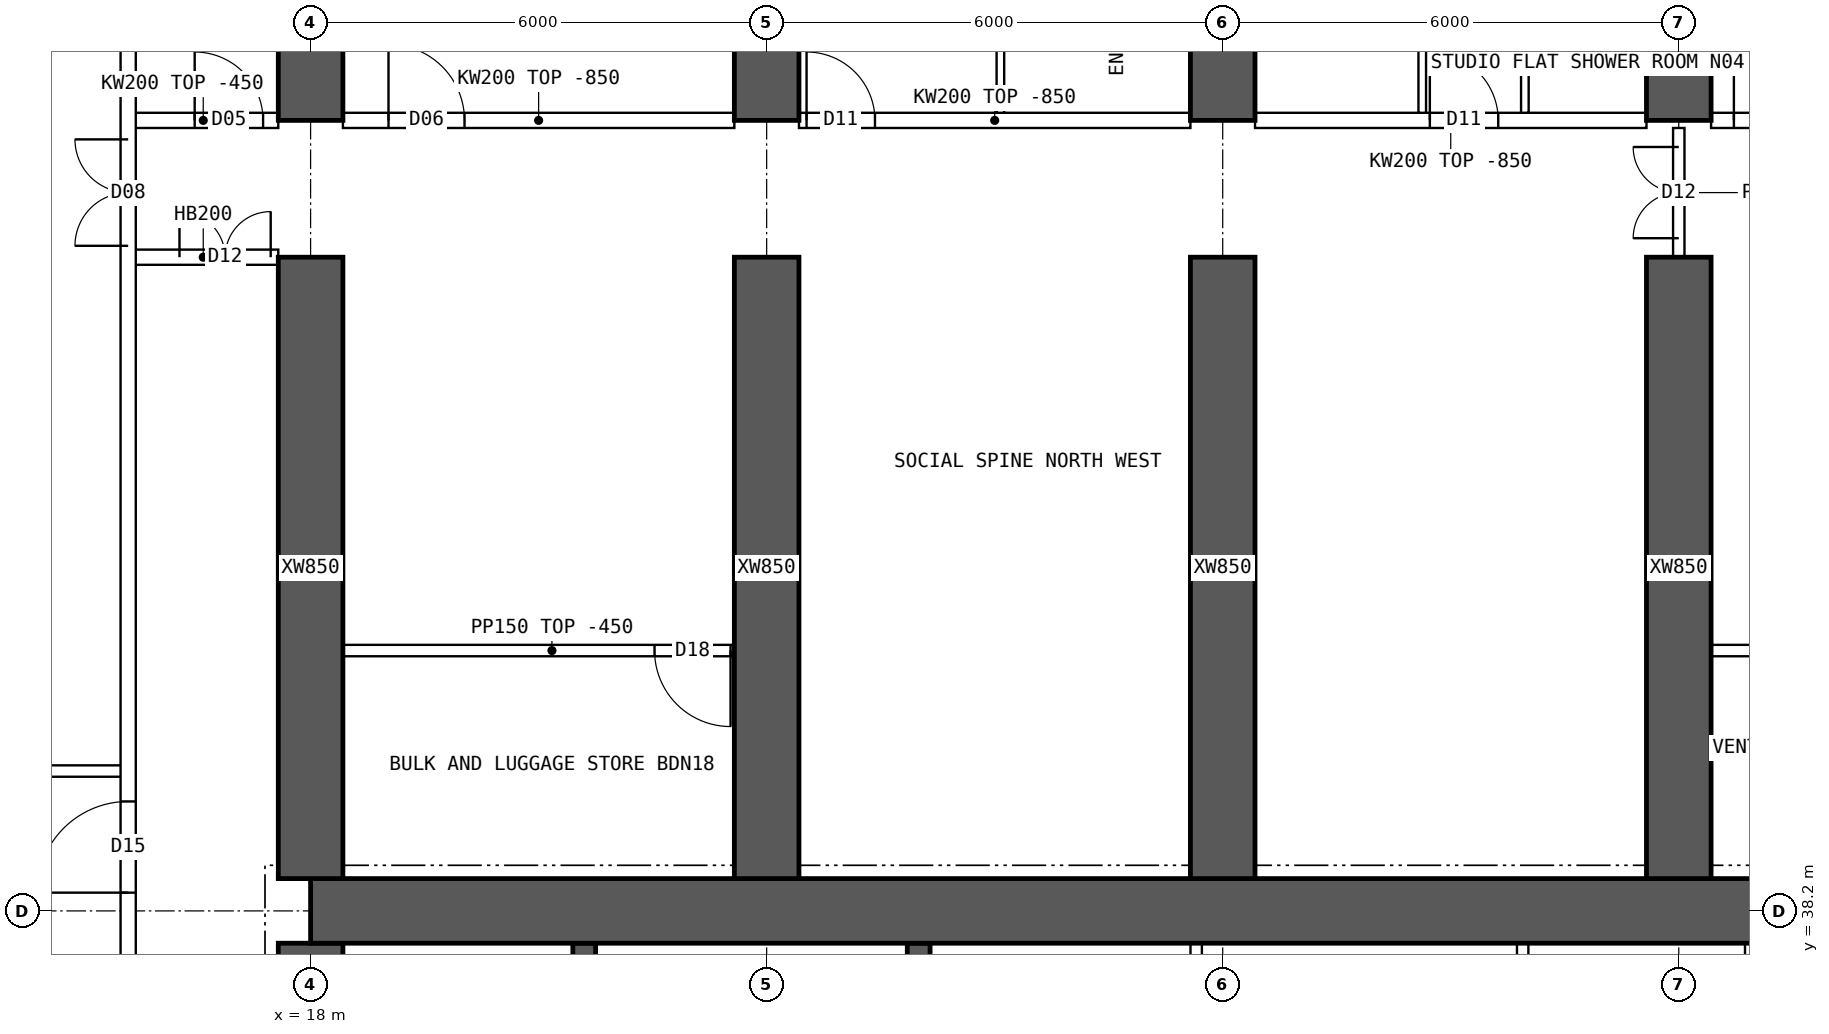
"""IFC4 building model, lengths in metres.
Left out: names, types, materials, properties, quantities, classifications, styles, units other than length and angle.
Written with IfcOpenShell. Run it as: python <this file> out.ifc"""

import sys

from ifc_helpers import new_model, si_unit, direction, frame, frame_2d, origin, place, context, subcontext, project, spatial, polyline, rectangle, outline, extrude, element, fill, save


model = new_model("IFC4")
c1 = context("Model", 3, precision=1e-05, world=origin(), true_north=direction((0.0, 1.0)))
c2 = subcontext(c1, "Body", "Model", "MODEL_VIEW")
j1 = project(units=[si_unit("LENGTHUNIT", "METRE"), si_unit("PLANEANGLEUNIT", "RADIAN")], contexts=[c1])
p1 = place(None, origin())
s1 = spatial("IfcSite", under=j1, at=p1, CompositionType="ELEMENT")
p2 = place(p1, origin())
s2 = spatial("IfcBuilding", under=s1, at=p2, CompositionType="ELEMENT")
p3 = place(p2, frame((0.0, 0.0, 174.85)))
s3 = spatial("IfcBuildingStorey", under=s2, at=p3, CompositionType="ELEMENT", Elevation=174.85)
p4 = place(p3, frame((18.0, 38.2, 0.0), z_axis=(0.0, 0.0, 1.0), x_axis=(1.0, 0.0, 0.0)))
e1 = element("IfcWall", 1, at=p4, inside=s3, PredefinedType="SHEAR", context=c2, shape_type="SweptSolid", body=[
    extrude(rectangle(XDim=48.0, YDim=0.85, at=frame_2d((24.0, 0.0))), origin(), (0.0, 0.0, 1.0), 3.75),
])
p5 = place(p3, frame((18.0, 26.225, 0.0), z_axis=(0.0, 0.0, 1.0), x_axis=(0.0, 1.0, 0.0)))
e2 = element("IfcWall", 2, at=p5, inside=s3, PredefinedType="SHEAR", context=c2, shape_type="SweptSolid", body=[
    extrude(rectangle(XDim=11.55, YDim=0.85, at=frame_2d((5.775, 0.0))), origin(), (0.0, 0.0, 1.0), 3.75),
])
p6 = place(p5, frame((5.075, 0.0, 0.0)))
e3 = element("IfcOpeningElement", 3, at=p6, cuts=e2, PredefinedType="OPENING", context=c2, shape_type="SweptSolid", body=[
    extrude(rectangle(XDim=1.2, YDim=2.1, at=frame_2d((0.6, 1.05))), frame((0.0, 0.435, 0.0), z_axis=(0.0, -1.0, 0.0), x_axis=(1.0, 0.0, 0.0)), (0.0, 0.0, 1.0), 0.87),
])
for number, where, z_axis, x_axis in (
    (4, (21.6, 34.75, 0.0), (0.0, 0.0, 1.0), (0.0, 1.0, 0.0)),
    (5, (26.0, 34.75, 0.0), (0.0, 0.0, 1.0), (0.0, 1.0, 0.0)),
):
    element("IfcWall", number, at=place(p3, frame(where, z_axis=z_axis, x_axis=x_axis)), inside=s3, PredefinedType="SHEAR", context=c2, shape_type="SweptSolid", body=[
        extrude(rectangle(XDim=3.025, YDim=0.3, at=frame_2d((1.512, 0.0))), origin(), (0.0, 0.0, 1.0), 3.75),
    ])
p7 = place(p3, frame((18.0, 48.6, 0.0), z_axis=(0.0, 0.0, 1.0), x_axis=(0.0, 1.0, 0.0)))
e6 = element("IfcWall", 6, at=p7, inside=s3, PredefinedType="SHEAR", context=c2, shape_type="SweptSolid", body=[
    extrude(rectangle(XDim=5.4, YDim=0.85, at=frame_2d((2.7, 0.0))), origin(), (0.0, 0.0, 1.0), 3.75),
])
p8 = place(p3, frame((18.0, 38.625, 0.0), z_axis=(0.0, 0.0, 1.0), x_axis=(0.0, 1.0, 0.0)))
e7 = element("IfcWall", 7, at=p8, inside=s3, PredefinedType="SHEAR", context=c2, shape_type="SweptSolid", body=[
    extrude(rectangle(XDim=8.175, YDim=0.85, at=frame_2d((4.087, 0.0))), origin(), (0.0, 0.0, 1.0), 3.75),
])
p9 = place(p3, frame((24.0, 48.6, 0.0), z_axis=(0.0, 0.0, 1.0), x_axis=(0.0, 1.0, 0.0)))
e8 = element("IfcWall", 8, at=p9, inside=s3, PredefinedType="SHEAR", context=c2, shape_type="SweptSolid", body=[
    extrude(rectangle(XDim=5.4, YDim=0.85, at=frame_2d((2.7, 0.0))), origin(), (0.0, 0.0, 1.0), 3.75),
])
p10 = place(p3, frame((24.0, 38.625, 0.0), z_axis=(0.0, 0.0, 1.0), x_axis=(0.0, 1.0, 0.0)))
e9 = element("IfcWall", 9, at=p10, inside=s3, PredefinedType="SHEAR", context=c2, shape_type="SweptSolid", body=[
    extrude(rectangle(XDim=8.175, YDim=0.85, at=frame_2d((4.087, 0.0))), origin(), (0.0, 0.0, 1.0), 3.75),
])
p11 = place(p3, frame((30.0, 48.6, 0.0), z_axis=(0.0, 0.0, 1.0), x_axis=(0.0, 1.0, 0.0)))
e10 = element("IfcWall", 10, at=p11, inside=s3, PredefinedType="SHEAR", context=c2, shape_type="SweptSolid", body=[
    extrude(rectangle(XDim=5.4, YDim=0.85, at=frame_2d((2.7, 0.0))), origin(), (0.0, 0.0, 1.0), 3.75),
])
p12 = place(p3, frame((30.0, 38.625, 0.0), z_axis=(0.0, 0.0, 1.0), x_axis=(0.0, 1.0, 0.0)))
e11 = element("IfcWall", 11, at=p12, inside=s3, PredefinedType="SHEAR", context=c2, shape_type="SweptSolid", body=[
    extrude(rectangle(XDim=8.175, YDim=0.85, at=frame_2d((4.087, 0.0))), origin(), (0.0, 0.0, 1.0), 3.75),
])
p13 = place(p3, frame((36.0, 48.6, 0.0), z_axis=(0.0, 0.0, 1.0), x_axis=(0.0, 1.0, 0.0)))
e12 = element("IfcWall", 12, at=p13, inside=s3, PredefinedType="SHEAR", context=c2, shape_type="SweptSolid", body=[
    extrude(rectangle(XDim=5.4, YDim=0.85, at=frame_2d((2.7, 0.0))), origin(), (0.0, 0.0, 1.0), 3.75),
])
p14 = place(p3, frame((36.0, 38.625, 0.0), z_axis=(0.0, 0.0, 1.0), x_axis=(0.0, 1.0, 0.0)))
e13 = element("IfcWall", 13, at=p14, inside=s3, PredefinedType="SHEAR", context=c2, shape_type="SweptSolid", body=[
    extrude(rectangle(XDim=8.175, YDim=0.85, at=frame_2d((4.087, 0.0))), origin(), (0.0, 0.0, 1.0), 3.75),
])
for number, where, z_axis, x_axis in (
    (14, (29.651, 34.75, 0.0), (0.0, 0.0, 1.0), (0.0, 1.0, 0.0)),
    (15, (33.946, 34.75, 0.0), (0.0, 0.0, 1.0), (0.0, 1.0, 0.0)),
    (16, (36.946, 34.75, 0.0), (0.0, 0.0, 1.0), (0.0, 1.0, 0.0)),
):
    element("IfcWall", number, at=place(p3, frame(where, z_axis=z_axis, x_axis=x_axis)), inside=s3, PredefinedType="SOLIDWALL", context=c2, shape_type="SweptSolid", body=[
        extrude(rectangle(XDim=3.025, YDim=0.15, at=frame_2d((1.512, 0.0))), origin(), (0.0, 0.0, 1.0), 3.3),
    ])
p15 = place(p3, frame((15.6, 48.6, 0.0), z_axis=(0.0, 0.0, 1.0), x_axis=(1.0, 0.0, 0.0)))
e17 = element("IfcWall", 17, at=p15, inside=s3, PredefinedType="SOLIDWALL", context=c2, shape_type="SweptSolid", body=[
    extrude(rectangle(XDim=1.975, YDim=0.2, at=frame_2d((0.987, 0.0))), origin(), (0.0, 0.0, 1.0), 3.3),
])
p16 = place(p15, frame((0.875, 0.0, 0.0)))
e18 = element("IfcOpeningElement", 18, at=p16, cuts=e17, PredefinedType="OPENING", context=c2, shape_type="SweptSolid", body=[
    extrude(rectangle(XDim=0.9, YDim=2.1, at=frame_2d((0.45, 1.05))), frame((0.0, 0.11, 0.0), z_axis=(0.0, -1.0, 0.0), x_axis=(1.0, 0.0, 0.0)), (0.0, 0.0, 1.0), 0.22),
])
p17 = place(p3, frame((15.6, 46.8, 0.0), z_axis=(0.0, 0.0, 1.0), x_axis=(1.0, 0.0, 0.0)))
e19 = element("IfcWall", 19, at=p17, inside=s3, PredefinedType="SOLIDWALL", context=c2, shape_type="SweptSolid", body=[
    extrude(rectangle(XDim=1.975, YDim=0.2, at=frame_2d((0.987, 0.0))), origin(), (0.0, 0.0, 1.0), 3.3),
])
p18 = place(p17, frame((0.675, 0.0, 0.0)))
e20 = element("IfcOpeningElement", 20, at=p18, cuts=e19, PredefinedType="OPENING", context=c2, shape_type="SweptSolid", body=[
    extrude(rectangle(XDim=1.2, YDim=2.1, at=frame_2d((0.6, 1.05))), frame((0.0, 0.11, 0.0), z_axis=(0.0, -1.0, 0.0), x_axis=(1.0, 0.0, 0.0)), (0.0, 0.0, 1.0), 0.22),
])
p19 = place(p3, frame((18.425, 48.6, 0.0), z_axis=(0.0, 0.0, 1.0), x_axis=(1.0, 0.0, 0.0)))
e21 = element("IfcWall", 21, at=p19, inside=s3, PredefinedType="SOLIDWALL", context=c2, shape_type="SweptSolid", body=[
    extrude(outline(polyline([(0.0, 0.0), (5.15, 0.0), (5.15, 2.9), (0.0, 2.9), (0.0, 0.0)])), frame((0.0, 0.1, 0.0), z_axis=(0.0, -1.0, 0.0), x_axis=(1.0, 0.0, 0.0)), (0.0, 0.0, 1.0), 0.2),
])
p20 = place(p19, frame((0.6, 0.0, 0.0)))
e22 = element("IfcOpeningElement", 22, at=p20, cuts=e21, PredefinedType="OPENING", context=c2, shape_type="SweptSolid", body=[
    extrude(rectangle(XDim=1.0, YDim=2.1, at=frame_2d((0.5, 1.05))), frame((0.0, 0.11, 0.0), z_axis=(0.0, -1.0, 0.0), x_axis=(1.0, 0.0, 0.0)), (0.0, 0.0, 1.0), 0.22),
])
p21 = place(p3, frame((24.425, 48.6, 0.0), z_axis=(0.0, 0.0, 1.0), x_axis=(1.0, 0.0, 0.0)))
e23 = element("IfcWall", 23, at=p21, inside=s3, PredefinedType="SOLIDWALL", context=c2, shape_type="SweptSolid", body=[
    extrude(outline(polyline([(0.0, 0.0), (5.15, 0.0), (5.15, 2.9), (0.0, 2.9), (0.0, 0.0)])), frame((0.0, 0.1, 0.0), z_axis=(0.0, -1.0, 0.0), x_axis=(1.0, 0.0, 0.0)), (0.0, 0.0, 1.0), 0.2),
])
p22 = place(p21, frame((0.1, 0.0, 0.0)))
e24 = element("IfcOpeningElement", 24, at=p22, cuts=e23, PredefinedType="OPENING", context=c2, shape_type="SweptSolid", body=[
    extrude(rectangle(XDim=0.9, YDim=2.1, at=frame_2d((0.45, 1.05))), frame((0.0, 0.11, 0.0), z_axis=(0.0, -1.0, 0.0), x_axis=(1.0, 0.0, 0.0)), (0.0, 0.0, 1.0), 0.22),
])
p23 = place(p3, frame((30.425, 48.6, 0.0), z_axis=(0.0, 0.0, 1.0), x_axis=(1.0, 0.0, 0.0)))
e25 = element("IfcWall", 25, at=p23, inside=s3, PredefinedType="SOLIDWALL", context=c2, shape_type="SweptSolid", body=[
    extrude(outline(polyline([(0.0, 0.0), (5.15, 0.0), (5.15, 2.9), (0.0, 2.9), (0.0, 0.0)])), frame((0.0, 0.1, 0.0), z_axis=(0.0, -1.0, 0.0), x_axis=(1.0, 0.0, 0.0)), (0.0, 0.0, 1.0), 0.2),
])
p24 = place(p23, frame((2.3, 0.0, 0.0)))
e26 = element("IfcOpeningElement", 26, at=p24, cuts=e25, PredefinedType="OPENING", context=c2, shape_type="SweptSolid", body=[
    extrude(rectangle(XDim=0.9, YDim=2.1, at=frame_2d((0.45, 1.05))), frame((0.0, 0.11, 0.0), z_axis=(0.0, -1.0, 0.0), x_axis=(1.0, 0.0, 0.0)), (0.0, 0.0, 1.0), 0.22),
])
p25 = place(p3, frame((36.425, 48.6, 0.0), z_axis=(0.0, 0.0, 1.0), x_axis=(1.0, 0.0, 0.0)))
e27 = element("IfcWall", 27, at=p25, inside=s3, PredefinedType="SOLIDWALL", context=c2, shape_type="SweptSolid", body=[
    extrude(outline(polyline([(0.0, 0.0), (5.15, 0.0), (5.15, 2.9), (0.0, 2.9), (0.0, 0.0)])), frame((0.0, 0.1, 0.0), z_axis=(0.0, -1.0, 0.0), x_axis=(1.0, 0.0, 0.0)), (0.0, 0.0, 1.0), 0.2),
])
p26 = place(p25, frame((0.3, 0.0, 0.0)))
e28 = element("IfcOpeningElement", 28, at=p26, cuts=e27, PredefinedType="OPENING", context=c2, shape_type="SweptSolid", body=[
    extrude(rectangle(XDim=1.0, YDim=2.1, at=frame_2d((0.5, 1.05))), frame((0.0, 0.11, 0.0), z_axis=(0.0, -1.0, 0.0), x_axis=(1.0, 0.0, 0.0)), (0.0, 0.0, 1.0), 0.22),
])
p27 = place(p3, frame((27.075, 51.45, 0.0), z_axis=(0.0, 0.0, 1.0), x_axis=(0.0, -1.0, 0.0)))
e29 = element("IfcWall", 29, at=p27, inside=s3, PredefinedType="PARTITIONING", context=c2, shape_type="SweptSolid", body=[
    extrude(outline(polyline([(0.0, 0.0), (2.75, 0.0), (2.75, 2.9), (2.702, 2.9), (2.7, 3.3), (0.0, 3.3), (0.0, 0.0)])), frame((0.0, 0.05, 0.0), z_axis=(0.0, -1.0, 0.0), x_axis=(1.0, 0.0, 0.0)), (0.0, 0.0, 1.0), 0.1),
])
p28 = place(p3, frame((32.625, 51.05, 0.0), z_axis=(0.0, 0.0, 1.0), x_axis=(0.0, -1.0, 0.0)))
e30 = element("IfcWall", 30, at=p28, inside=s3, PredefinedType="PARTITIONING", context=c2, shape_type="SweptSolid", body=[
    extrude(outline(polyline([(0.0, 0.0), (2.35, 0.0), (2.35, 2.9), (2.302, 2.9), (2.3, 3.3), (0.0, 3.3), (0.0, 0.0)])), frame((0.0, 0.05, 0.0), z_axis=(0.0, -1.0, 0.0), x_axis=(1.0, 0.0, 0.0)), (0.0, 0.0, 1.0), 0.1),
])
p29 = place(p3, frame((33.975, 51.05, 0.0), z_axis=(0.0, 0.0, 1.0), x_axis=(0.0, -1.0, 0.0)))
e31 = element("IfcWall", 31, at=p29, inside=s3, PredefinedType="PARTITIONING", context=c2, shape_type="SweptSolid", body=[
    extrude(outline(polyline([(0.0, 0.0), (2.35, 0.0), (2.35, 2.9), (2.302, 2.9), (2.3, 3.3), (0.0, 3.3), (0.0, 0.0)])), frame((0.0, 0.05, 0.0), z_axis=(0.0, -1.0, 0.0), x_axis=(1.0, 0.0, 0.0)), (0.0, 0.0, 1.0), 0.1),
])
p30 = place(p29, frame((0.8, 0.0, 0.0)))
e32 = element("IfcOpeningElement", 32, at=p30, cuts=e31, PredefinedType="OPENING", context=c2, shape_type="SweptSolid", body=[
    extrude(rectangle(XDim=0.8, YDim=2.1, at=frame_2d((0.4, 1.05))), frame((0.0, 0.06, 0.0), z_axis=(0.0, -1.0, 0.0), x_axis=(1.0, 0.0, 0.0)), (0.0, 0.0, 1.0), 0.12),
])
p31 = place(p3, frame((23.925, 41.625, 0.0), z_axis=(0.0, 0.0, 1.0), x_axis=(-1.0, 0.0, 0.0)))
e33 = element("IfcWall", 33, at=p31, inside=s3, PredefinedType="PARTITIONING", context=c2, shape_type="SweptSolid", body=[
    extrude(rectangle(XDim=5.5, YDim=0.15, at=frame_2d((2.75, 0.0))), origin(), (0.0, 0.0, 1.0), 3.3),
])
p32 = place(p31, frame((0.4, 0.0, 0.0)))
e34 = element("IfcOpeningElement", 34, at=p32, cuts=e33, PredefinedType="OPENING", context=c2, shape_type="SweptSolid", body=[
    extrude(rectangle(XDim=1.0, YDim=2.1, at=frame_2d((0.5, 1.05))), frame((0.0, 0.085, 0.0), z_axis=(0.0, -1.0, 0.0), x_axis=(1.0, 0.0, 0.0)), (0.0, 0.0, 1.0), 0.17),
])
p33 = place(p3, frame((41.575, 41.625, 0.0), z_axis=(0.0, 0.0, 1.0), x_axis=(-1.0, 0.0, 0.0)))
e35 = element("IfcWall", 35, at=p33, inside=s3, PredefinedType="PARTITIONING", context=c2, shape_type="SweptSolid", body=[
    extrude(rectangle(XDim=5.5, YDim=0.15, at=frame_2d((2.75, 0.0))), origin(), (0.0, 0.0, 1.0), 3.3),
])
p34 = place(p33, frame((0.4, 0.0, 0.0)))
e36 = element("IfcOpeningElement", 36, at=p34, cuts=e35, PredefinedType="OPENING", context=c2, shape_type="SweptSolid", body=[
    extrude(rectangle(XDim=1.0, YDim=2.1, at=frame_2d((0.5, 1.05))), frame((0.0, 0.085, 0.0), z_axis=(0.0, -1.0, 0.0), x_axis=(1.0, 0.0, 0.0)), (0.0, 0.0, 1.0), 0.17),
])
p35 = place(p3, frame((36.0, 46.8, 0.0), z_axis=(0.0, 0.0, 1.0), x_axis=(0.0, 1.0, 0.0)))
e37 = element("IfcWall", 37, at=p35, inside=s3, PredefinedType="PARTITIONING", context=c2, shape_type="SweptSolid", body=[
    extrude(outline(polyline([(0.0, 0.0), (1.7, 0.0), (1.7, 2.9), (0.0, 2.9), (0.0, 0.0)])), frame((0.0, 0.075, 0.0), z_axis=(0.0, -1.0, 0.0), x_axis=(1.0, 0.0, 0.0)), (0.0, 0.0, 1.0), 0.15),
])
p36 = place(p35, frame((0.25, 0.0, 0.0)))
e38 = element("IfcOpeningElement", 38, at=p36, cuts=e37, PredefinedType="OPENING", context=c2, shape_type="SweptSolid", body=[
    extrude(rectangle(XDim=1.2, YDim=2.1, at=frame_2d((0.6, 1.05))), frame((0.0, 0.085, 0.0), z_axis=(0.0, -1.0, 0.0), x_axis=(1.0, 0.0, 0.0)), (0.0, 0.0, 1.0), 0.17),
])
p37 = place(p3, frame((15.6, 10.446, 0.0), z_axis=(0.0, 0.0, 1.0), x_axis=(0.0, 1.0, 0.0)))
e39 = element("IfcWall", 39, at=p37, inside=s3, PredefinedType="SOLIDWALL", context=c2, shape_type="SweptSolid", body=[
    extrude(rectangle(XDim=43.107, YDim=0.2, at=frame_2d((21.554, 0.0))), origin(), (0.0, 0.0, 1.0), 3.3),
])
p38 = place(p37, frame((13.914, 0.0, 0.0)))
e40 = element("IfcOpeningElement", 40, at=p38, cuts=e39, PredefinedType="OPENING", context=c2, shape_type="SweptSolid", body=[
    extrude(rectangle(XDim=1.2, YDim=2.1, at=frame_2d((0.6, 1.05))), frame((0.0, 0.11, 0.0), z_axis=(0.0, -1.0, 0.0), x_axis=(1.0, 0.0, 0.0)), (0.0, 0.0, 1.0), 0.22),
])
p39 = place(p37, frame((27.994, 0.0, 0.0)))
e41 = element("IfcOpeningElement", 41, at=p39, cuts=e39, PredefinedType="OPENING", context=c2, shape_type="SweptSolid", body=[
    extrude(rectangle(XDim=1.2, YDim=2.1, at=frame_2d((0.6, 1.05))), frame((0.0, 0.11, 0.0), z_axis=(0.0, -1.0, 0.0), x_axis=(1.0, 0.0, 0.0)), (0.0, 0.0, 1.0), 0.22),
])
p40 = place(p37, frame((5.104, 0.0, 0.0)))
e42 = element("IfcOpeningElement", 42, at=p40, cuts=e39, PredefinedType="OPENING", context=c2, shape_type="SweptSolid", body=[
    extrude(rectangle(XDim=1.4, YDim=2.1, at=frame_2d((0.7, 1.05))), frame((0.0, 0.11, 0.0), z_axis=(0.0, -1.0, 0.0), x_axis=(1.0, 0.0, 0.0)), (0.0, 0.0, 1.0), 0.22),
])
p41 = place(p37, frame((36.504, 0.0, 0.0)))
e43 = element("IfcOpeningElement", 43, at=p41, cuts=e39, PredefinedType="OPENING", context=c2, shape_type="SweptSolid", body=[
    extrude(rectangle(XDim=1.4, YDim=2.1, at=frame_2d((0.7, 1.05))), frame((0.0, 0.11, 0.0), z_axis=(0.0, -1.0, 0.0), x_axis=(1.0, 0.0, 0.0)), (0.0, 0.0, 1.0), 0.22),
])
p42 = place(p3, frame((8.705, 40.04, 0.0), z_axis=(0.0, 0.0, 1.0), x_axis=(1.0, 0.0, 0.0)))
e44 = element("IfcWall", 44, at=p42, inside=s3, PredefinedType="PARTITIONING", context=c2, shape_type="SweptSolid", body=[
    extrude(rectangle(XDim=6.82, YDim=0.15, at=frame_2d((3.41, 0.0))), origin(), (0.0, 0.0, 1.0), 3.3),
])
p43 = place(p18, origin())
e45 = element("IfcDoor", 45, at=p43, inside=s3, OperationType="DOUBLE_DOOR_SINGLE_SWING", PredefinedType="DOOR", context=c2, shape_type="SweptSolid", body=[
    extrude(rectangle(XDim=1.2, YDim=2.1, at=frame_2d((0.6, 1.05))), frame((0.0, 0.025, 0.0), z_axis=(0.0, -1.0, 0.0), x_axis=(1.0, 0.0, 0.0)), (0.0, 0.0, 1.0), 0.05),
])
fill(e20, e45)
p44 = place(p20, origin())
e46 = element("IfcDoor", 46, at=p44, inside=s3, OperationType="SINGLE_SWING_LEFT", PredefinedType="DOOR", context=c2, shape_type="SweptSolid", body=[
    extrude(rectangle(XDim=1.0, YDim=2.1, at=frame_2d((0.5, 1.05))), frame((0.0, 0.025, 0.0), z_axis=(0.0, -1.0, 0.0), x_axis=(1.0, 0.0, 0.0)), (0.0, 0.0, 1.0), 0.05),
])
fill(e22, e46)
p45 = place(p22, origin())
e47 = element("IfcDoor", 47, at=p45, inside=s3, OperationType="SINGLE_SWING_LEFT", PredefinedType="DOOR", context=c2, shape_type="SweptSolid", body=[
    extrude(rectangle(XDim=0.9, YDim=2.1, at=frame_2d((0.45, 1.05))), frame((0.0, 0.025, 0.0), z_axis=(0.0, -1.0, 0.0), x_axis=(1.0, 0.0, 0.0)), (0.0, 0.0, 1.0), 0.05),
])
fill(e24, e47)
p46 = place(p30, origin())
e48 = element("IfcDoor", 48, at=p46, inside=s3, OperationType="SINGLE_SWING_RIGHT", PredefinedType="DOOR", context=c2, shape_type="SweptSolid", body=[
    extrude(rectangle(XDim=0.8, YDim=2.1, at=frame_2d((0.4, 1.05))), frame((0.0, 0.025, 0.0), z_axis=(0.0, -1.0, 0.0), x_axis=(1.0, 0.0, 0.0)), (0.0, 0.0, 1.0), 0.05),
])
fill(e32, e48)
p47 = place(p24, origin())
e49 = element("IfcDoor", 49, at=p47, inside=s3, OperationType="SINGLE_SWING_LEFT", PredefinedType="DOOR", context=c2, shape_type="SweptSolid", body=[
    extrude(rectangle(XDim=0.9, YDim=2.1, at=frame_2d((0.45, 1.05))), frame((0.0, 0.025, 0.0), z_axis=(0.0, -1.0, 0.0), x_axis=(1.0, 0.0, 0.0)), (0.0, 0.0, 1.0), 0.05),
])
fill(e26, e49)
p48 = place(p26, origin())
e50 = element("IfcDoor", 50, at=p48, inside=s3, OperationType="SINGLE_SWING_LEFT", PredefinedType="DOOR", context=c2, shape_type="SweptSolid", body=[
    extrude(rectangle(XDim=1.0, YDim=2.1, at=frame_2d((0.5, 1.05))), frame((0.0, 0.025, 0.0), z_axis=(0.0, -1.0, 0.0), x_axis=(1.0, 0.0, 0.0)), (0.0, 0.0, 1.0), 0.05),
])
fill(e28, e50)
p49 = place(p32, origin())
e51 = element("IfcDoor", 51, at=p49, inside=s3, OperationType="SINGLE_SWING_LEFT", PredefinedType="DOOR", context=c2, shape_type="SweptSolid", body=[
    extrude(rectangle(XDim=1.0, YDim=2.1, at=frame_2d((0.5, 1.05))), frame((0.0, 0.025, 0.0), z_axis=(0.0, -1.0, 0.0), x_axis=(1.0, 0.0, 0.0)), (0.0, 0.0, 1.0), 0.05),
])
fill(e34, e51)
p50 = place(p36, origin())
e52 = element("IfcDoor", 52, at=p50, inside=s3, OperationType="DOUBLE_DOOR_SINGLE_SWING", PredefinedType="DOOR", context=c2, shape_type="SweptSolid", body=[
    extrude(rectangle(XDim=1.2, YDim=2.1, at=frame_2d((0.6, 1.05))), frame((0.0, 0.025, 0.0), z_axis=(0.0, -1.0, 0.0), x_axis=(1.0, 0.0, 0.0)), (0.0, 0.0, 1.0), 0.05),
])
fill(e38, e52)
p51 = place(p39, origin())
e53 = element("IfcDoor", 53, at=p51, inside=s3, OperationType="SINGLE_SWING_LEFT", PredefinedType="DOOR", context=c2, shape_type="SweptSolid", body=[
    extrude(rectangle(XDim=1.2, YDim=2.1, at=frame_2d((0.6, 1.05))), frame((0.0, 0.025, 0.0), z_axis=(0.0, -1.0, 0.0), x_axis=(1.0, 0.0, 0.0)), (0.0, 0.0, 1.0), 0.05),
])
fill(e41, e53)
p52 = place(p41, origin())
e54 = element("IfcDoor", 54, at=p52, inside=s3, OperationType="DOUBLE_DOOR_SINGLE_SWING", PredefinedType="DOOR", context=c2, shape_type="SweptSolid", body=[
    extrude(rectangle(XDim=1.4, YDim=2.1, at=frame_2d((0.7, 1.05))), frame((0.0, 0.025, 0.0), z_axis=(0.0, -1.0, 0.0), x_axis=(1.0, 0.0, 0.0)), (0.0, 0.0, 1.0), 0.05),
])
fill(e43, e54)
p53 = place(p16, origin())
e55 = element("IfcDoor", 55, at=p53, inside=s3, OperationType="SINGLE_SWING_LEFT", PredefinedType="DOOR", context=c2, shape_type="SweptSolid", body=[
    extrude(rectangle(XDim=0.9, YDim=2.1, at=frame_2d((0.45, 1.05))), frame((0.0, 0.025, 0.0), z_axis=(0.0, -1.0, 0.0), x_axis=(1.0, 0.0, 0.0)), (0.0, 0.0, 1.0), 0.05),
])
fill(e18, e55)
save(model, sys.argv[1])
